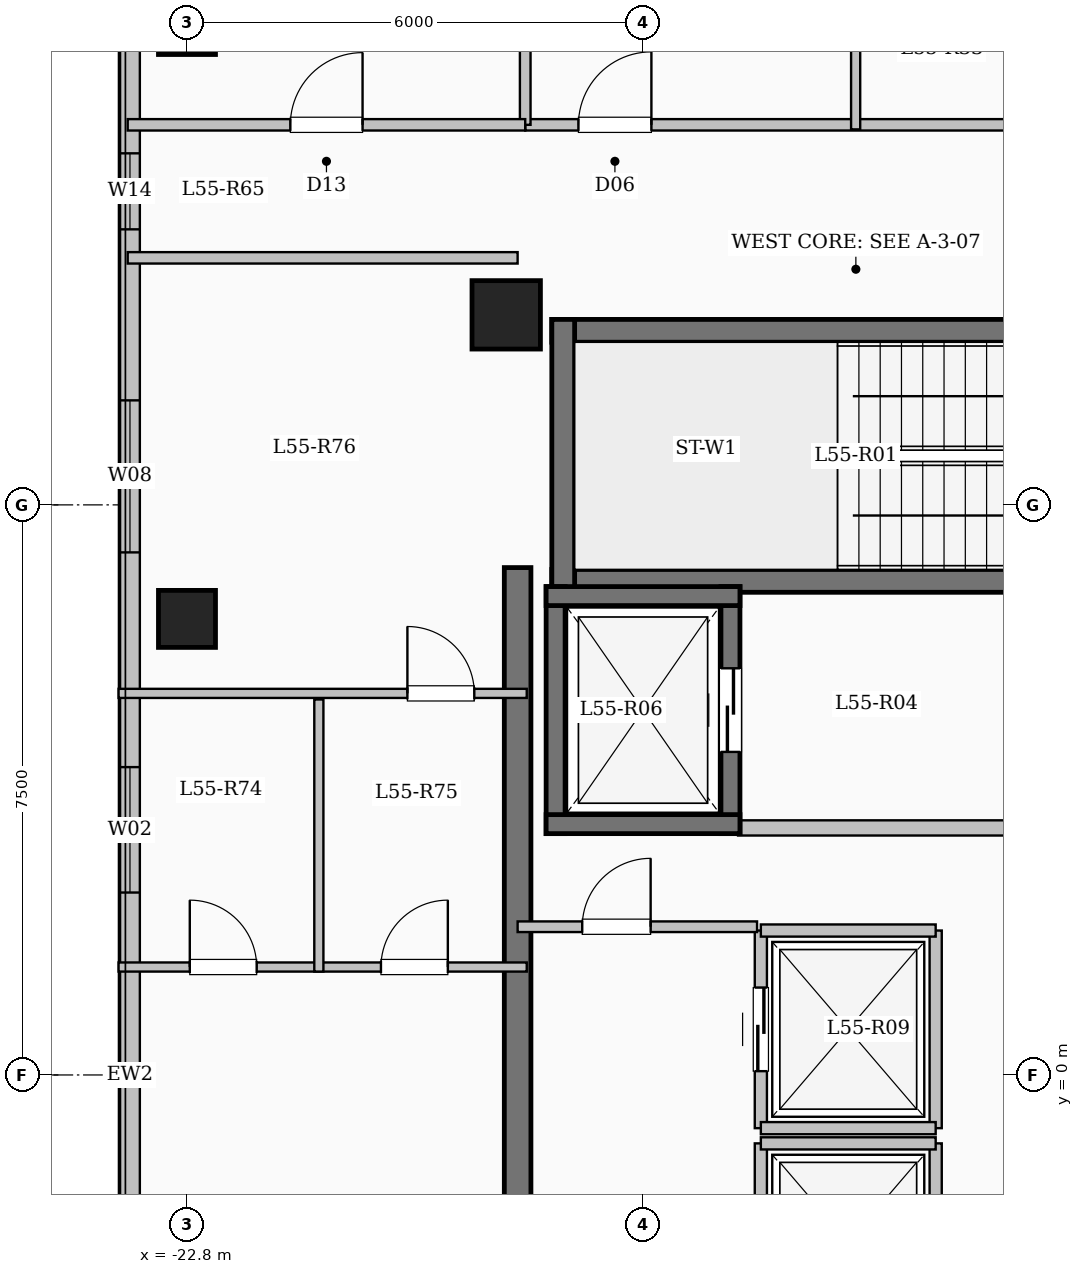
"""IFC4 building model, lengths in metres.
Left out: names, types, materials, properties, quantities, classifications, styles, units other than length and angle.
Written with IfcOpenShell. Run it as: python <this file> out.ifc"""

import sys

from ifc_helpers import new_model, si_unit, direction, frame, frame_2d, origin, origin_2d, place, context, subcontext, project, spatial, rectangle, extrude, element, fill, save


model = new_model("IFC4")
c1 = context("Model", 3, precision=1e-05, world=origin(), true_north=direction((0.0, 1.0)))
c2 = subcontext(c1, "Body", "Model", "MODEL_VIEW")
j1 = project(units=[si_unit("LENGTHUNIT", "METRE"), si_unit("PLANEANGLEUNIT", "RADIAN")], contexts=[c1])
p1 = place(None, origin())
s1 = spatial("IfcSite", under=j1, at=p1, CompositionType="ELEMENT")
p2 = place(p1, origin())
s2 = spatial("IfcBuilding", under=s1, at=p2, CompositionType="ELEMENT")
p3 = place(p2, frame((0.0, 0.0, 203.65)))
s3 = spatial("IfcBuildingStorey", under=s2, at=p3, CompositionType="ELEMENT", Elevation=203.65)
p4 = place(p3, frame((-18.6, 10.0, 0.0), z_axis=(0.0, 0.0, 1.0), x_axis=(1.0, 0.0, 0.0)))
e1 = element("IfcColumn", 1, at=p4, inside=s3, PredefinedType="COLUMN", context=c2, shape_type="SweptSolid", body=[
    extrude(rectangle(XDim=0.9, YDim=0.9, at=origin_2d()), origin(), (0.0, 0.0, 1.0), 3.35),
])
for number, where, z_axis, x_axis in (
    (2, (-22.8, 6.0, 0.0), (0.0, 0.0, 1.0), (1.0, 0.0, 0.0)),
    (3, (-22.8, 13.8, 0.0), (0.0, 0.0, 1.0), (1.0, 0.0, 0.0)),
):
    element("IfcColumn", number, at=place(p3, frame(where, z_axis=z_axis, x_axis=x_axis)), inside=s3, PredefinedType="COLUMN", context=c2, shape_type="SweptSolid", body=[
        extrude(rectangle(XDim=0.75, YDim=0.75, at=origin_2d()), origin(), (0.0, 0.0, 1.0), 3.35),
    ])
p5 = place(p3, frame((-23.55, -17.25, 0.0), z_axis=(0.0, 0.0, 1.0), x_axis=(0.0, 1.0, 0.0)))
e4 = element("IfcWall", 4, at=p5, inside=s3, PredefinedType="SOLIDWALL", context=c2, shape_type="SweptSolid", body=[
    extrude(rectangle(XDim=34.5, YDim=0.26, at=frame_2d((17.25, 0.0))), origin(), (0.0, 0.0, 1.0), 3.1),
])
p6 = place(p5, frame((2.825, 0.0, 0.9)))
e5 = element("IfcOpeningElement", 5, at=p6, cuts=e4, PredefinedType="OPENING", context=c2, shape_type="SweptSolid", body=[
    extrude(rectangle(XDim=2.2, YDim=1.75, at=frame_2d((1.1, 0.875))), frame((0.0, 0.14, 0.0), z_axis=(0.0, -1.0, 0.0), x_axis=(1.0, 0.0, 0.0)), (0.0, 0.0, 1.0), 0.28),
])
p7 = place(p5, frame((8.325, 0.0, 0.95)))
e6 = element("IfcOpeningElement", 6, at=p7, cuts=e4, PredefinedType="OPENING", context=c2, shape_type="SweptSolid", body=[
    extrude(rectangle(XDim=1.2, YDim=1.5, at=frame_2d((0.6, 0.75))), frame((0.0, 0.14, 0.0), z_axis=(0.0, -1.0, 0.0), x_axis=(1.0, 0.0, 0.0)), (0.0, 0.0, 1.0), 0.28),
])
p8 = place(p5, frame((13.25, 0.0, 0.9)))
e7 = element("IfcOpeningElement", 7, at=p8, cuts=e4, PredefinedType="OPENING", context=c2, shape_type="SweptSolid", body=[
    extrude(rectangle(XDim=2.2, YDim=1.75, at=frame_2d((1.1, 0.875))), frame((0.0, 0.14, 0.0), z_axis=(0.0, -1.0, 0.0), x_axis=(1.0, 0.0, 0.0)), (0.0, 0.0, 1.0), 0.28),
])
p9 = place(p5, frame((19.65, 0.0, 0.9)))
e8 = element("IfcOpeningElement", 8, at=p9, cuts=e4, PredefinedType="OPENING", context=c2, shape_type="SweptSolid", body=[
    extrude(rectangle(XDim=1.65, YDim=1.6, at=frame_2d((0.825, 0.8))), frame((0.0, 0.14, 0.0), z_axis=(0.0, -1.0, 0.0), x_axis=(1.0, 0.0, 0.0)), (0.0, 0.0, 1.0), 0.28),
])
p10 = place(p5, frame((24.125, 0.0, 0.9)))
e9 = element("IfcOpeningElement", 9, at=p10, cuts=e4, PredefinedType="OPENING", context=c2, shape_type="SweptSolid", body=[
    extrude(rectangle(XDim=2.0, YDim=1.7, at=frame_2d((1.0, 0.85))), frame((0.0, 0.14, 0.0), z_axis=(0.0, -1.0, 0.0), x_axis=(1.0, 0.0, 0.0)), (0.0, 0.0, 1.0), 0.28),
])
p11 = place(p5, frame((28.375, 0.0, 0.95)))
e10 = element("IfcOpeningElement", 10, at=p11, cuts=e4, PredefinedType="OPENING", context=c2, shape_type="SweptSolid", body=[
    extrude(rectangle(XDim=1.0, YDim=1.5, at=frame_2d((0.5, 0.75))), frame((0.0, 0.14, 0.0), z_axis=(0.0, -1.0, 0.0), x_axis=(1.0, 0.0, 0.0)), (0.0, 0.0, 1.0), 0.28),
])
p12 = place(p5, frame((31.125, 0.0, 0.9)))
e11 = element("IfcOpeningElement", 11, at=p12, cuts=e4, PredefinedType="OPENING", context=c2, shape_type="SweptSolid", body=[
    extrude(rectangle(XDim=2.0, YDim=1.7, at=frame_2d((1.0, 0.85))), frame((0.0, 0.14, 0.0), z_axis=(0.0, -1.0, 0.0), x_axis=(1.0, 0.0, 0.0)), (0.0, 0.0, 1.0), 0.28),
])
p13 = place(p3, frame((-18.0, 9.79, 0.0), z_axis=(0.0, 0.0, 1.0), x_axis=(1.0, 0.0, 0.0)))
e12 = element("IfcWall", 12, at=p13, inside=s3, PredefinedType="SHEAR", context=c2, shape_type="SweptSolid", body=[
    extrude(rectangle(XDim=8.0, YDim=0.3, at=frame_2d((4.0, 0.0))), origin(), (0.0, 0.0, 1.0), 3.35),
])
p14 = place(p3, frame((-18.0, 6.5, 0.0), z_axis=(0.0, 0.0, 1.0), x_axis=(1.0, 0.0, 0.0)))
e13 = element("IfcWall", 13, at=p14, inside=s3, PredefinedType="SHEAR", context=c2, shape_type="SweptSolid", body=[
    extrude(rectangle(XDim=8.0, YDim=0.3, at=frame_2d((4.0, 0.0))), origin(), (0.0, 0.0, 1.0), 3.35),
])
p15 = place(p14, frame((6.45, 0.0, 0.0)))
e14 = element("IfcOpeningElement", 14, at=p15, cuts=e13, PredefinedType="OPENING", context=c2, shape_type="SweptSolid", body=[
    extrude(rectangle(XDim=1.0, YDim=2.15, at=frame_2d((0.5, 1.075))), frame((0.0, 0.16, 0.0), z_axis=(0.0, -1.0, 0.0), x_axis=(1.0, 0.0, 0.0)), (0.0, 0.0, 1.0), 0.32),
])
p16 = place(p3, frame((-17.85, 6.35, 0.0), z_axis=(0.0, 0.0, 1.0), x_axis=(0.0, 1.0, 0.0)))
e15 = element("IfcWall", 15, at=p16, inside=s3, PredefinedType="SHEAR", context=c2, shape_type="SweptSolid", body=[
    extrude(rectangle(XDim=3.59, YDim=0.3, at=frame_2d((1.795, 0.0))), origin(), (0.0, 0.0, 1.0), 3.35),
])
p17 = place(p3, frame((-15.55, 3.25, 0.0), z_axis=(0.0, 0.0, 1.0), x_axis=(1.0, 0.0, 0.0)))
e16 = element("IfcWall", 16, at=p17, inside=s3, PredefinedType="SOLIDWALL", context=c2, shape_type="SweptSolid", body=[
    extrude(rectangle(XDim=5.4, YDim=0.2, at=frame_2d((2.7, 0.0))), origin(), (0.0, 0.0, 1.0), 3.1),
])
p18 = place(p3, frame((-17.95, 3.175, 0.0), z_axis=(0.0, 0.0, 1.0), x_axis=(0.0, 1.0, 0.0)))
e17 = element("IfcWall", 17, at=p18, inside=s3, PredefinedType="SHEAR", context=c2, shape_type="SweptSolid", body=[
    extrude(rectangle(XDim=3.25, YDim=0.25, at=frame_2d((1.625, 0.0))), origin(), (0.0, 0.0, 1.0), 3.35),
])
p19 = place(p3, frame((-15.65, 3.175, 0.0), z_axis=(0.0, 0.0, 1.0), x_axis=(0.0, 1.0, 0.0)))
e18 = element("IfcWall", 18, at=p19, inside=s3, PredefinedType="SHEAR", context=c2, shape_type="SweptSolid", body=[
    extrude(rectangle(XDim=3.25, YDim=0.25, at=frame_2d((1.625, 0.0))), origin(), (0.0, 0.0, 1.0), 3.35),
])
p20 = place(p19, frame((1.075, 0.0, 0.0)))
e19 = element("IfcOpeningElement", 19, at=p20, cuts=e18, PredefinedType="OPENING", context=c2, shape_type="SweptSolid", body=[
    extrude(rectangle(XDim=1.1, YDim=2.15, at=frame_2d((0.55, 1.075))), frame((0.0, 0.135, 0.0), z_axis=(0.0, -1.0, 0.0), x_axis=(1.0, 0.0, 0.0)), (0.0, 0.0, 1.0), 0.27),
])
for number, where, z_axis, x_axis in (
    (20, (-18.075, 3.3, 0.0), (0.0, 0.0, 1.0), (1.0, 0.0, 0.0)),
    (21, (-18.075, 6.3, 0.0), (0.0, 0.0, 1.0), (1.0, 0.0, 0.0)),
):
    element("IfcWall", number, at=place(p3, frame(where, z_axis=z_axis, x_axis=x_axis)), inside=s3, PredefinedType="SHEAR", context=c2, shape_type="SweptSolid", body=[
        extrude(rectangle(XDim=2.55, YDim=0.25, at=frame_2d((1.275, 0.0))), origin(), (0.0, 0.0, 1.0), 3.35),
    ])
p21 = place(p3, frame((-15.25, -3.5, 0.0), z_axis=(0.0, 0.0, 1.0), x_axis=(0.0, 1.0, 0.0)))
e22 = element("IfcWall", 22, at=p21, inside=s3, PredefinedType="SOLIDWALL", context=c2, shape_type="SweptSolid", body=[
    extrude(rectangle(XDim=2.6, YDim=0.16, at=frame_2d((1.3, 0.0))), origin(), (0.0, 0.0, 1.0), 3.1),
])
p22 = place(p21, frame((0.75, 0.0, 0.0)))
e23 = element("IfcOpeningElement", 23, at=p22, cuts=e22, PredefinedType="OPENING", context=c2, shape_type="SweptSolid", body=[
    extrude(rectangle(XDim=1.1, YDim=2.15, at=frame_2d((0.55, 1.075))), frame((0.0, 0.09, 0.0), z_axis=(0.0, -1.0, 0.0), x_axis=(1.0, 0.0, 0.0)), (0.0, 0.0, 1.0), 0.18),
])
p23 = place(p3, frame((-12.95, -3.5, 0.0), z_axis=(0.0, 0.0, 1.0), x_axis=(0.0, 1.0, 0.0)))
e24 = element("IfcWall", 24, at=p23, inside=s3, PredefinedType="SOLIDWALL", context=c2, shape_type="SweptSolid", body=[
    extrude(rectangle(XDim=2.6, YDim=0.16, at=frame_2d((1.3, 0.0))), origin(), (0.0, 0.0, 1.0), 3.1),
])
p24 = place(p3, frame((-15.25, -0.9, 0.0), z_axis=(0.0, 0.0, 1.0), x_axis=(1.0, 0.0, 0.0)))
e25 = element("IfcWall", 25, at=p24, inside=s3, PredefinedType="SOLIDWALL", context=c2, shape_type="SweptSolid", body=[
    extrude(rectangle(XDim=2.3, YDim=0.16, at=frame_2d((1.15, 0.0))), origin(), (0.0, 0.0, 1.0), 3.1),
])
p25 = place(p3, frame((-15.25, -0.7, 0.0), z_axis=(0.0, 0.0, 1.0), x_axis=(0.0, 1.0, 0.0)))
e26 = element("IfcWall", 26, at=p25, inside=s3, PredefinedType="SOLIDWALL", context=c2, shape_type="SweptSolid", body=[
    extrude(rectangle(XDim=2.6, YDim=0.16, at=frame_2d((1.3, 0.0))), origin(), (0.0, 0.0, 1.0), 3.1),
])
p26 = place(p25, frame((0.75, 0.0, 0.0)))
e27 = element("IfcOpeningElement", 27, at=p26, cuts=e26, PredefinedType="OPENING", context=c2, shape_type="SweptSolid", body=[
    extrude(rectangle(XDim=1.1, YDim=2.15, at=frame_2d((0.55, 1.075))), frame((0.0, 0.09, 0.0), z_axis=(0.0, -1.0, 0.0), x_axis=(1.0, 0.0, 0.0)), (0.0, 0.0, 1.0), 0.18),
])
p27 = place(p3, frame((-12.95, -0.7, 0.0), z_axis=(0.0, 0.0, 1.0), x_axis=(0.0, 1.0, 0.0)))
e28 = element("IfcWall", 28, at=p27, inside=s3, PredefinedType="SOLIDWALL", context=c2, shape_type="SweptSolid", body=[
    extrude(rectangle(XDim=2.6, YDim=0.16, at=frame_2d((1.3, 0.0))), origin(), (0.0, 0.0, 1.0), 3.1),
])
for number, where, z_axis, x_axis in (
    (29, (-15.25, -0.7, 0.0), (0.0, 0.0, 1.0), (1.0, 0.0, 0.0)),
    (30, (-15.25, 1.9, 0.0), (0.0, 0.0, 1.0), (1.0, 0.0, 0.0)),
):
    element("IfcWall", number, at=place(p3, frame(where, z_axis=z_axis, x_axis=x_axis)), inside=s3, PredefinedType="SOLIDWALL", context=c2, shape_type="SweptSolid", body=[
        extrude(rectangle(XDim=2.3, YDim=0.16, at=frame_2d((1.15, 0.0))), origin(), (0.0, 0.0, 1.0), 3.1),
    ])
p28 = place(p3, frame((-18.45, -7.375, 0.0), z_axis=(0.0, 0.0, 1.0), x_axis=(0.0, 1.0, 0.0)))
e31 = element("IfcWall", 31, at=p28, inside=s3, PredefinedType="SHEAR", context=c2, shape_type="SweptSolid", body=[
    extrude(rectangle(XDim=14.05, YDim=0.35, at=frame_2d((7.025, 0.0))), origin(), (0.0, 0.0, 1.0), 3.35),
])
p29 = place(p3, frame((-18.45, 1.95, 0.0), z_axis=(0.0, 0.0, 1.0), x_axis=(1.0, 0.0, 0.0)))
e32 = element("IfcWall", 32, at=p29, inside=s3, PredefinedType="PARTITIONING", context=c2, shape_type="SweptSolid", body=[
    extrude(rectangle(XDim=3.15, YDim=0.14, at=frame_2d((1.575, 0.0))), origin(), (0.0, 0.0, 1.0), 3.1),
])
p30 = place(p29, frame((0.85, 0.0, 0.0)))
e33 = element("IfcOpeningElement", 33, at=p30, cuts=e32, PredefinedType="OPENING", context=c2, shape_type="SweptSolid", body=[
    extrude(rectangle(XDim=0.9, YDim=2.08, at=frame_2d((0.45, 1.04))), frame((0.0, 0.08, 0.0), z_axis=(0.0, -1.0, 0.0), x_axis=(1.0, 0.0, 0.0)), (0.0, 0.0, 1.0), 0.16),
])
p31 = place(p3, frame((-18.35, 12.5, 0.0), z_axis=(0.0, 0.0, 1.0), x_axis=(1.0, 0.0, 0.0)))
e34 = element("IfcWall", 34, at=p31, inside=s3, PredefinedType="PARTITIONING", context=c2, shape_type="SweptSolid", body=[
    extrude(rectangle(XDim=14.5, YDim=0.15, at=frame_2d((7.25, 0.0))), origin(), (0.0, 0.0, 1.0), 3.1),
])
p32 = place(p31, frame((0.7, 0.0, 0.0)))
e35 = element("IfcOpeningElement", 35, at=p32, cuts=e34, PredefinedType="OPENING", context=c2, shape_type="SweptSolid", body=[
    extrude(rectangle(XDim=0.96, YDim=2.15, at=frame_2d((0.48, 1.075))), frame((0.0, 0.085, 0.0), z_axis=(0.0, -1.0, 0.0), x_axis=(1.0, 0.0, 0.0)), (0.0, 0.0, 1.0), 0.17),
])
p33 = place(p31, frame((9.394, 0.0, 0.0)))
e36 = element("IfcOpeningElement", 36, at=p33, cuts=e34, PredefinedType="OPENING", context=c2, shape_type="SweptSolid", body=[
    extrude(rectangle(XDim=0.96, YDim=2.15, at=frame_2d((0.48, 1.075))), frame((0.0, 0.085, 0.0), z_axis=(0.0, -1.0, 0.0), x_axis=(1.0, 0.0, 0.0)), (0.0, 0.0, 1.0), 0.17),
])
p34 = place(p3, frame((-14.003, 12.44, 0.0), z_axis=(0.0, 0.0, 1.0), x_axis=(0.0, 1.0, 0.0)))
e37 = element("IfcWall", 37, at=p34, inside=s3, PredefinedType="PARTITIONING", context=c2, shape_type="SweptSolid", body=[
    extrude(rectangle(XDim=8.46, YDim=0.12, at=frame_2d((4.23, 0.0))), origin(), (0.0, 0.0, 1.0), 3.1),
])
p35 = place(p34, frame((2.905, 0.0, 0.0)))
e38 = element("IfcOpeningElement", 38, at=p35, cuts=e37, PredefinedType="OPENING", context=c2, shape_type="SweptSolid", body=[
    extrude(rectangle(XDim=1.08, YDim=2.15, at=frame_2d((0.54, 1.075))), frame((0.0, 0.07, 0.0), z_axis=(0.0, -1.0, 0.0), x_axis=(1.0, 0.0, 0.0)), (0.0, 0.0, 1.0), 0.14),
])
p36 = place(p3, frame((-23.58, 10.75, 0.0), z_axis=(0.0, 0.0, 1.0), x_axis=(1.0, 0.0, 0.0)))
e39 = element("IfcWall", 39, at=p36, inside=s3, PredefinedType="PARTITIONING", context=c2, shape_type="SweptSolid", body=[
    extrude(rectangle(XDim=5.13, YDim=0.15, at=frame_2d((2.565, 0.0))), origin(), (0.0, 0.0, 1.0), 3.1),
])
p37 = place(p3, frame((-18.35, 12.5, 0.0), z_axis=(0.0, 0.0, 1.0), x_axis=(0.0, 1.0, 0.0)))
e40 = element("IfcWall", 40, at=p37, inside=s3, PredefinedType="PARTITIONING", context=c2, shape_type="SweptSolid", body=[
    extrude(rectangle(XDim=4.75, YDim=0.14, at=frame_2d((2.375, 0.0))), origin(), (0.0, 0.0, 1.0), 3.1),
])
p38 = place(p3, frame((-23.58, 12.5, 0.0), z_axis=(0.0, 0.0, 1.0), x_axis=(1.0, 0.0, 0.0)))
e41 = element("IfcWall", 41, at=p38, inside=s3, PredefinedType="PARTITIONING", context=c2, shape_type="SweptSolid", body=[
    extrude(rectangle(XDim=5.23, YDim=0.15, at=frame_2d((2.615, 0.0))), origin(), (0.0, 0.0, 1.0), 3.1),
])
p39 = place(p38, frame((2.14, 0.0, 0.0)))
e42 = element("IfcOpeningElement", 42, at=p39, cuts=e41, PredefinedType="OPENING", context=c2, shape_type="SweptSolid", body=[
    extrude(rectangle(XDim=0.95, YDim=2.15, at=frame_2d((0.475, 1.075))), frame((0.0, 0.085, 0.0), z_axis=(0.0, -1.0, 0.0), x_axis=(1.0, 0.0, 0.0)), (0.0, 0.0, 1.0), 0.17),
])
p40 = place(p3, frame((-23.7, 1.42, 0.0), z_axis=(0.0, 0.0, 1.0), x_axis=(1.0, 0.0, 0.0)))
e43 = element("IfcWall", 43, at=p40, inside=s3, PredefinedType="PARTITIONING", context=c2, shape_type="SweptSolid", body=[
    extrude(rectangle(XDim=5.37, YDim=0.12, at=frame_2d((2.685, 0.0))), origin(), (0.0, 0.0, 1.0), 3.1),
])
p41 = place(p40, frame((0.937, 0.0, 0.0)))
e44 = element("IfcOpeningElement", 44, at=p41, cuts=e43, PredefinedType="OPENING", context=c2, shape_type="SweptSolid", body=[
    extrude(rectangle(XDim=0.88, YDim=2.1, at=frame_2d((0.44, 1.05))), frame((0.0, 0.07, 0.0), z_axis=(0.0, -1.0, 0.0), x_axis=(1.0, 0.0, 0.0)), (0.0, 0.0, 1.0), 0.14),
])
p42 = place(p40, frame((3.452, 0.0, 0.0)))
e45 = element("IfcOpeningElement", 45, at=p42, cuts=e43, PredefinedType="OPENING", context=c2, shape_type="SweptSolid", body=[
    extrude(rectangle(XDim=0.88, YDim=2.1, at=frame_2d((0.44, 1.05))), frame((0.0, 0.07, 0.0), z_axis=(0.0, -1.0, 0.0), x_axis=(1.0, 0.0, 0.0)), (0.0, 0.0, 1.0), 0.14),
])
p43 = place(p3, frame((-23.7, 5.02, 0.0), z_axis=(0.0, 0.0, 1.0), x_axis=(1.0, 0.0, 0.0)))
e46 = element("IfcWall", 46, at=p43, inside=s3, PredefinedType="PARTITIONING", context=c2, shape_type="SweptSolid", body=[
    extrude(rectangle(XDim=5.37, YDim=0.12, at=frame_2d((2.685, 0.0))), origin(), (0.0, 0.0, 1.0), 3.1),
])
p44 = place(p43, frame((3.8, 0.0, 0.0)))
e47 = element("IfcOpeningElement", 47, at=p44, cuts=e46, PredefinedType="OPENING", context=c2, shape_type="SweptSolid", body=[
    extrude(rectangle(XDim=0.88, YDim=2.1, at=frame_2d((0.44, 1.05))), frame((0.0, 0.07, 0.0), z_axis=(0.0, -1.0, 0.0), x_axis=(1.0, 0.0, 0.0)), (0.0, 0.0, 1.0), 0.14),
])
p45 = place(p3, frame((-21.065, 1.36, 0.0), z_axis=(0.0, 0.0, 1.0), x_axis=(0.0, 1.0, 0.0)))
e48 = element("IfcWall", 48, at=p45, inside=s3, PredefinedType="PARTITIONING", context=c2, shape_type="SweptSolid", body=[
    extrude(rectangle(XDim=3.58, YDim=0.12, at=frame_2d((1.79, 0.0))), origin(), (0.0, 0.0, 1.0), 3.1),
])
p46 = place(p9, origin())
e49 = element("IfcWindow", 49, at=p46, inside=s3, PartitioningType="SINGLE_PANEL", PredefinedType="WINDOW", context=c2, shape_type="SweptSolid", body=[
    extrude(rectangle(XDim=1.65, YDim=1.6, at=frame_2d((0.825, 0.8))), frame((0.0, 0.03, 0.0), z_axis=(0.0, -1.0, 0.0), x_axis=(1.0, 0.0, 0.0)), (0.0, 0.0, 1.0), 0.06),
])
fill(e8, e49)
p47 = place(p10, origin())
e50 = element("IfcWindow", 50, at=p47, inside=s3, PartitioningType="SINGLE_PANEL", PredefinedType="WINDOW", context=c2, shape_type="SweptSolid", body=[
    extrude(rectangle(XDim=2.0, YDim=1.7, at=frame_2d((1.0, 0.85))), frame((0.0, 0.03, 0.0), z_axis=(0.0, -1.0, 0.0), x_axis=(1.0, 0.0, 0.0)), (0.0, 0.0, 1.0), 0.06),
])
fill(e9, e50)
p48 = place(p11, origin())
e51 = element("IfcWindow", 51, at=p48, inside=s3, PartitioningType="SINGLE_PANEL", PredefinedType="WINDOW", context=c2, shape_type="SweptSolid", body=[
    extrude(rectangle(XDim=1.0, YDim=1.5, at=frame_2d((0.5, 0.75))), frame((0.0, 0.03, 0.0), z_axis=(0.0, -1.0, 0.0), x_axis=(1.0, 0.0, 0.0)), (0.0, 0.0, 1.0), 0.06),
])
fill(e10, e51)
p49 = place(p20, origin())
e52 = element("IfcDoor", 52, at=p49, inside=s3, OperationType="SLIDING_TO_LEFT", PredefinedType="DOOR", context=c2, shape_type="SweptSolid", body=[
    extrude(rectangle(XDim=1.1, YDim=2.15, at=frame_2d((0.55, 1.075))), frame((0.0, 0.025, 0.0), z_axis=(0.0, -1.0, 0.0), x_axis=(1.0, 0.0, 0.0)), (0.0, 0.0, 1.0), 0.05),
])
fill(e19, e52)
p50 = place(p26, origin())
e53 = element("IfcDoor", 53, at=p50, inside=s3, OperationType="SLIDING_TO_LEFT", PredefinedType="DOOR", context=c2, shape_type="SweptSolid", body=[
    extrude(rectangle(XDim=1.1, YDim=2.15, at=frame_2d((0.55, 1.075))), frame((0.0, 0.025, 0.0), z_axis=(0.0, -1.0, 0.0), x_axis=(1.0, 0.0, 0.0)), (0.0, 0.0, 1.0), 0.05),
])
fill(e27, e53)
p51 = place(p30, origin())
e54 = element("IfcDoor", 54, at=p51, inside=s3, OperationType="SINGLE_SWING_RIGHT", PredefinedType="DOOR", context=c2, shape_type="SweptSolid", body=[
    extrude(rectangle(XDim=0.9, YDim=2.08, at=frame_2d((0.45, 1.04))), frame((0.0, 0.025, 0.0), z_axis=(0.0, -1.0, 0.0), x_axis=(1.0, 0.0, 0.0)), (0.0, 0.0, 1.0), 0.05),
])
fill(e33, e54)
p52 = place(p32, origin())
e55 = element("IfcDoor", 55, at=p52, inside=s3, OperationType="SINGLE_SWING_RIGHT", PredefinedType="DOOR", context=c2, shape_type="SweptSolid", body=[
    extrude(rectangle(XDim=0.96, YDim=2.15, at=frame_2d((0.48, 1.075))), frame((0.0, 0.025, 0.0), z_axis=(0.0, -1.0, 0.0), x_axis=(1.0, 0.0, 0.0)), (0.0, 0.0, 1.0), 0.05),
])
fill(e35, e55)
p53 = place(p39, origin())
e56 = element("IfcDoor", 56, at=p53, inside=s3, OperationType="SINGLE_SWING_RIGHT", PredefinedType="DOOR", context=c2, shape_type="SweptSolid", body=[
    extrude(rectangle(XDim=0.95, YDim=2.15, at=frame_2d((0.475, 1.075))), frame((0.0, 0.025, 0.0), z_axis=(0.0, -1.0, 0.0), x_axis=(1.0, 0.0, 0.0)), (0.0, 0.0, 1.0), 0.05),
])
fill(e42, e56)
p54 = place(p41, origin())
e57 = element("IfcDoor", 57, at=p54, inside=s3, OperationType="SINGLE_SWING_LEFT", PredefinedType="DOOR", context=c2, shape_type="SweptSolid", body=[
    extrude(rectangle(XDim=0.88, YDim=2.1, at=frame_2d((0.44, 1.05))), frame((0.0, 0.025, 0.0), z_axis=(0.0, -1.0, 0.0), x_axis=(1.0, 0.0, 0.0)), (0.0, 0.0, 1.0), 0.05),
])
fill(e44, e57)
p55 = place(p42, origin())
e58 = element("IfcDoor", 58, at=p55, inside=s3, OperationType="SINGLE_SWING_RIGHT", PredefinedType="DOOR", context=c2, shape_type="SweptSolid", body=[
    extrude(rectangle(XDim=0.88, YDim=2.1, at=frame_2d((0.44, 1.05))), frame((0.0, 0.025, 0.0), z_axis=(0.0, -1.0, 0.0), x_axis=(1.0, 0.0, 0.0)), (0.0, 0.0, 1.0), 0.05),
])
fill(e45, e58)
p56 = place(p44, origin())
e59 = element("IfcDoor", 59, at=p56, inside=s3, OperationType="SINGLE_SWING_LEFT", PredefinedType="DOOR", context=c2, shape_type="SweptSolid", body=[
    extrude(rectangle(XDim=0.88, YDim=2.1, at=frame_2d((0.44, 1.05))), frame((0.0, 0.025, 0.0), z_axis=(0.0, -1.0, 0.0), x_axis=(1.0, 0.0, 0.0)), (0.0, 0.0, 1.0), 0.05),
])
fill(e47, e59)
save(model, sys.argv[1])
